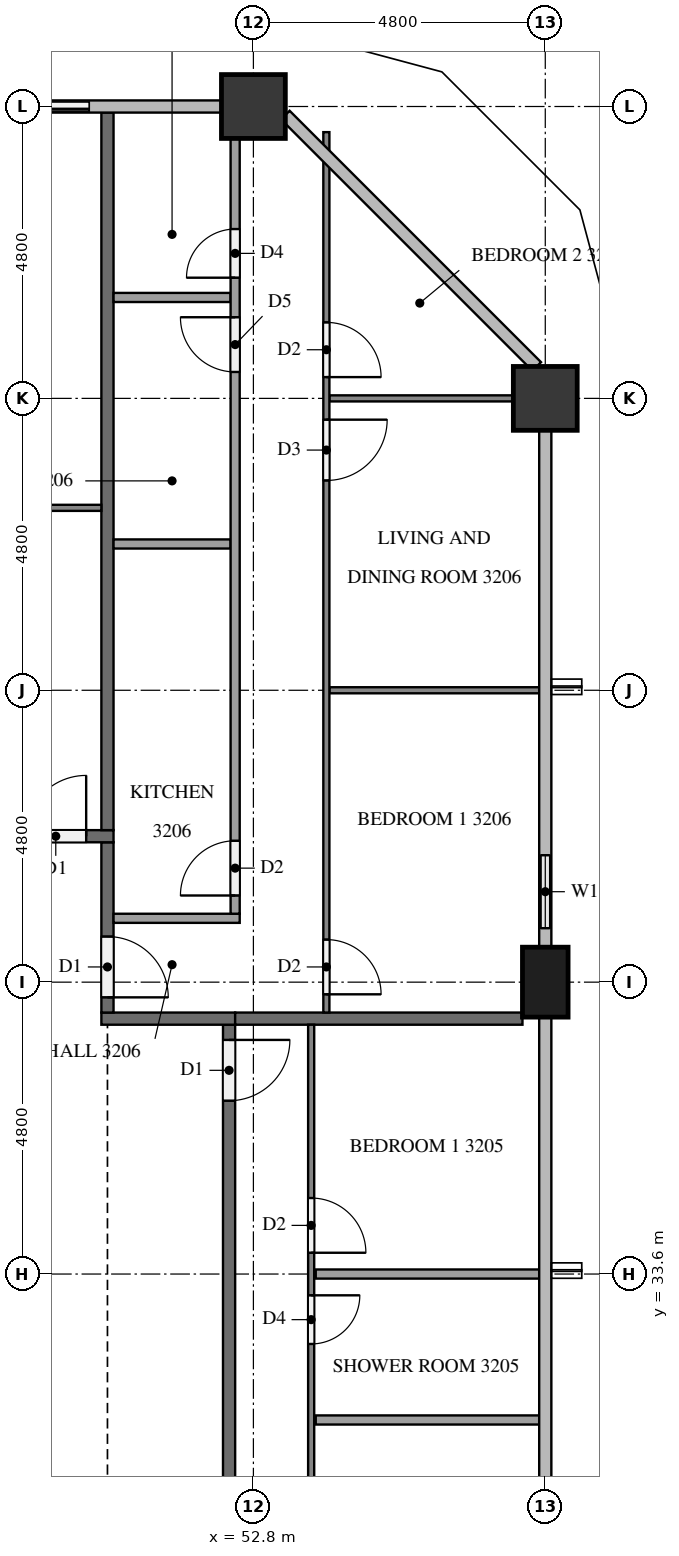
"""IFC4 building model, lengths in metres.
Left out: names, types, materials, properties, quantities, classifications, styles, units other than length and angle.
Written with IfcOpenShell. Run it as: python <this file> out.ifc"""

import sys

from ifc_helpers import new_model, si_unit, direction, frame, frame_2d, origin, origin_2d, place, context, subcontext, project, spatial, rectangle, extrude, element, fill, save


model = new_model("IFC4")
c1 = context("Model", 3, precision=1e-05, world=origin(), true_north=direction((0.0, 1.0)))
c2 = subcontext(c1, "Body", "Model", "MODEL_VIEW")
j1 = project(units=[si_unit("LENGTHUNIT", "METRE"), si_unit("PLANEANGLEUNIT", "RADIAN")], contexts=[c1])
p1 = place(None, origin())
s1 = spatial("IfcSite", under=j1, at=p1, CompositionType="ELEMENT")
p2 = place(p1, origin())
s2 = spatial("IfcBuilding", under=s1, at=p2, CompositionType="ELEMENT")
p3 = place(p2, frame((0.0, 0.0, 126.1)))
s3 = spatial("IfcBuildingStorey", under=s2, at=p3, CompositionType="ELEMENT", Elevation=126.1)
p4 = place(p3, frame((57.6, 38.4, 0.0), z_axis=(0.0, 0.0, 1.0), x_axis=(0.0, 1.0, 0.0)))
e1 = element("IfcColumn", 1, at=p4, inside=s3, PredefinedType="COLUMN", context=c2, shape_type="SweptSolid", body=[
    extrude(rectangle(XDim=1.15, YDim=0.75, at=origin_2d()), origin(), (0.0, 0.0, 1.0), 3.2),
])
for number, where, z_axis, x_axis in (
    (2, (57.6, 48.0, 0.0), (0.0, 0.0, 1.0), (1.0, 0.0, 0.0)),
    (3, (52.8, 52.8, 0.0), (0.0, 0.0, 1.0), (1.0, 0.0, 0.0)),
):
    element("IfcColumn", number, at=place(p3, frame(where, z_axis=z_axis, x_axis=x_axis)), inside=s3, PredefinedType="COLUMN", context=c2, shape_type="SweptSolid", body=[
        extrude(rectangle(XDim=1.05, YDim=1.05, at=origin_2d()), origin(), (0.0, 0.0, 1.0), 3.2),
    ])
p5 = place(p3, frame((57.6, 38.975, 0.0), z_axis=(0.0, 0.0, 1.0), x_axis=(0.0, 1.0, 0.0)))
e4 = element("IfcWall", 4, at=p5, inside=s3, PredefinedType="SOLIDWALL", context=c2, shape_type="SweptSolid", body=[
    extrude(rectangle(XDim=1.825, YDim=0.15, at=frame_2d((0.913, 0.0))), origin(), (0.0, 0.0, 1.0), 3.2),
])
p6 = place(p5, frame((0.312, 0.0, 0.9)))
e5 = element("IfcOpeningElement", 5, at=p6, cuts=e4, PredefinedType="OPENING", context=c2, shape_type="SweptSolid", body=[
    extrude(rectangle(XDim=1.2, YDim=1.4, at=frame_2d((0.6, 0.7))), frame((0.0, 0.085, 0.0), z_axis=(0.0, -1.0, 0.0), x_axis=(1.0, 0.0, 0.0)), (0.0, 0.0, 1.0), 0.17),
])
p7 = place(p3, frame((50.4, 52.8, 0.0), z_axis=(0.0, 0.0, 1.0), x_axis=(-1.0, 0.0, 0.0)))
e6 = element("IfcWall", 6, at=p7, inside=s3, PredefinedType="SOLIDWALL", context=c2, shape_type="SweptSolid", body=[
    extrude(rectangle(XDim=2.4, YDim=0.15, at=frame_2d((1.2, 0.0))), origin(), (0.0, 0.0, 1.0), 3.2),
])
p8 = place(p7, frame((0.3, 0.0, 0.0)))
e7 = element("IfcOpeningElement", 7, at=p8, cuts=e6, PredefinedType="OPENING", context=c2, shape_type="SweptSolid", body=[
    extrude(rectangle(XDim=1.8, YDim=2.4, at=frame_2d((0.9, 1.2))), frame((0.0, 0.085, 0.0), z_axis=(0.0, -1.0, 0.0), x_axis=(1.0, 0.0, 0.0)), (0.0, 0.0, 1.0), 0.17),
])
p9 = place(p3, frame((52.4, 37.7, 0.0), z_axis=(0.0, 0.0, 1.0), x_axis=(0.0, -1.0, 0.0)))
e8 = element("IfcWall", 8, at=p9, inside=s3, PredefinedType="PARTITIONING", context=c2, shape_type="SweptSolid", body=[
    extrude(rectangle(XDim=22.6, YDim=0.2, at=frame_2d((11.3, 0.0))), origin(), (0.0, 0.0, 1.0), 3.2),
])
p10 = place(p9, frame((0.25, 0.0, 0.0)))
e9 = element("IfcOpeningElement", 9, at=p10, cuts=e8, PredefinedType="OPENING", context=c2, shape_type="SweptSolid", body=[
    extrude(rectangle(XDim=1.0, YDim=2.1, at=frame_2d((0.5, 1.05))), frame((0.0, 0.11, 0.0), z_axis=(0.0, -1.0, 0.0), x_axis=(1.0, 0.0, 0.0)), (0.0, 0.0, 1.0), 0.22),
])
p11 = place(p3, frame((52.5, 37.8, 0.0), z_axis=(0.0, 0.0, 1.0), x_axis=(-1.0, 0.0, 0.0)))
e10 = element("IfcWall", 10, at=p11, inside=s3, PredefinedType="PARTITIONING", context=c2, shape_type="SweptSolid", body=[
    extrude(rectangle(XDim=2.2, YDim=0.2, at=frame_2d((1.1, 0.0))), origin(), (0.0, 0.0, 1.0), 3.2),
])
p12 = place(p3, frame((50.4, 40.7, 0.0), z_axis=(0.0, 0.0, 1.0), x_axis=(0.0, -1.0, 0.0)))
e11 = element("IfcWall", 11, at=p12, inside=s3, PredefinedType="PARTITIONING", context=c2, shape_type="SweptSolid", body=[
    extrude(rectangle(XDim=2.8, YDim=0.2, at=frame_2d((1.4, 0.0))), origin(), (0.0, 0.0, 1.0), 3.2),
])
p13 = place(p12, frame((1.55, 0.0, 0.0)))
e12 = element("IfcOpeningElement", 12, at=p13, cuts=e11, PredefinedType="OPENING", context=c2, shape_type="SweptSolid", body=[
    extrude(rectangle(XDim=1.0, YDim=2.1, at=frame_2d((0.5, 1.05))), frame((0.0, 0.11, 0.0), z_axis=(0.0, -1.0, 0.0), x_axis=(1.0, 0.0, 0.0)), (0.0, 0.0, 1.0), 0.22),
])
p14 = place(p3, frame((11.9, 40.8, 0.0), z_axis=(0.0, 0.0, 1.0), x_axis=(1.0, 0.0, 0.0)))
e13 = element("IfcWall", 13, at=p14, inside=s3, PredefinedType="PARTITIONING", context=c2, shape_type="SweptSolid", body=[
    extrude(rectangle(XDim=38.6, YDim=0.2, at=frame_2d((19.3, 0.0))), origin(), (0.0, 0.0, 1.0), 3.2),
])
p15 = place(p14, frame((37.15, 0.0, 0.0)))
e14 = element("IfcOpeningElement", 14, at=p15, cuts=e13, PredefinedType="OPENING", context=c2, shape_type="SweptSolid", body=[
    extrude(rectangle(XDim=1.0, YDim=2.1, at=frame_2d((0.5, 1.05))), frame((0.0, 0.11, 0.0), z_axis=(0.0, -1.0, 0.0), x_axis=(1.0, 0.0, 0.0)), (0.0, 0.0, 1.0), 0.22),
])
p16 = place(p14, frame((27.55, 0.0, 0.0)))
e15 = element("IfcOpeningElement", 15, at=p16, cuts=e13, PredefinedType="OPENING", context=c2, shape_type="SweptSolid", body=[
    extrude(rectangle(XDim=1.0, YDim=2.1, at=frame_2d((0.5, 1.05))), frame((0.0, 0.11, 0.0), z_axis=(0.0, -1.0, 0.0), x_axis=(1.0, 0.0, 0.0)), (0.0, 0.0, 1.0), 0.22),
])
p17 = place(p14, frame((13.15, 0.0, 0.0)))
e16 = element("IfcOpeningElement", 16, at=p17, cuts=e13, PredefinedType="OPENING", context=c2, shape_type="SweptSolid", body=[
    extrude(rectangle(XDim=1.0, YDim=2.1, at=frame_2d((0.5, 1.05))), frame((0.0, 0.11, 0.0), z_axis=(0.0, -1.0, 0.0), x_axis=(1.0, 0.0, 0.0)), (0.0, 0.0, 1.0), 0.22),
])
p18 = place(p3, frame((52.5, 37.8, 0.0), z_axis=(0.0, 0.0, 1.0), x_axis=(1.0, 0.0, 0.0)))
e17 = element("IfcWall", 17, at=p18, inside=s3, PredefinedType="PARTITIONING", context=c2, shape_type="SweptSolid", body=[
    extrude(rectangle(XDim=4.725, YDim=0.2, at=frame_2d((2.363, 0.0))), origin(), (0.0, 0.0, 1.0), 3.2),
])
p19 = place(p3, frame((50.4, 40.9, 0.0), z_axis=(0.0, 0.0, 1.0), x_axis=(0.0, 1.0, 0.0)))
e18 = element("IfcWall", 18, at=p19, inside=s3, PredefinedType="PARTITIONING", context=c2, shape_type="SweptSolid", body=[
    extrude(rectangle(XDim=11.8, YDim=0.2, at=frame_2d((5.9, 0.0))), origin(), (0.0, 0.0, 1.0), 3.2),
])
for number, where, z_axis, x_axis in (
    (19, (53.825, 33.6, 0.0), (0.0, 0.0, 1.0), (1.0, 0.0, 0.0)),
    (20, (53.825, 31.2, 0.0), (0.0, 0.0, 1.0), (1.0, 0.0, 0.0)),
):
    element("IfcWall", number, at=place(p3, frame(where, z_axis=z_axis, x_axis=x_axis)), inside=s3, PredefinedType="PARTITIONING", context=c2, shape_type="SweptSolid", body=[
        extrude(rectangle(XDim=3.675, YDim=0.15, at=frame_2d((1.837, 0.0))), origin(), (0.0, 0.0, 1.0), 3.2),
    ])
p20 = place(p3, frame((53.75, 37.7, 0.0), z_axis=(0.0, 0.0, 1.0), x_axis=(0.0, -1.0, 0.0)))
e21 = element("IfcWall", 21, at=p20, inside=s3, PredefinedType="PARTITIONING", context=c2, shape_type="SweptSolid", body=[
    extrude(rectangle(XDim=22.6, YDim=0.1, at=frame_2d((11.3, 0.0))), origin(), (0.0, 0.0, 1.0), 3.2),
])
p21 = place(p20, frame((2.85, 0.0, 0.0)))
e22 = element("IfcOpeningElement", 22, at=p21, cuts=e21, PredefinedType="OPENING", context=c2, shape_type="SweptSolid", body=[
    extrude(rectangle(XDim=0.9, YDim=2.1, at=frame_2d((0.45, 1.05))), frame((0.0, 0.06, 0.0), z_axis=(0.0, -1.0, 0.0), x_axis=(1.0, 0.0, 0.0)), (0.0, 0.0, 1.0), 0.12),
])
p22 = place(p20, frame((4.45, 0.0, 0.0)))
e23 = element("IfcOpeningElement", 23, at=p22, cuts=e21, PredefinedType="OPENING", context=c2, shape_type="SweptSolid", body=[
    extrude(rectangle(XDim=0.8, YDim=2.1, at=frame_2d((0.4, 1.05))), frame((0.0, 0.06, 0.0), z_axis=(0.0, -1.0, 0.0), x_axis=(1.0, 0.0, 0.0)), (0.0, 0.0, 1.0), 0.12),
])
p23 = place(p20, frame((7.65, 0.0, 0.0)))
e24 = element("IfcOpeningElement", 24, at=p23, cuts=e21, PredefinedType="OPENING", context=c2, shape_type="SweptSolid", body=[
    extrude(rectangle(XDim=0.9, YDim=2.1, at=frame_2d((0.45, 1.05))), frame((0.0, 0.06, 0.0), z_axis=(0.0, -1.0, 0.0), x_axis=(1.0, 0.0, 0.0)), (0.0, 0.0, 1.0), 0.12),
])
p24 = place(p20, frame((9.25, 0.0, 0.0)))
e25 = element("IfcOpeningElement", 25, at=p24, cuts=e21, PredefinedType="OPENING", context=c2, shape_type="SweptSolid", body=[
    extrude(rectangle(XDim=0.9, YDim=2.1, at=frame_2d((0.45, 1.05))), frame((0.0, 0.06, 0.0), z_axis=(0.0, -1.0, 0.0), x_axis=(1.0, 0.0, 0.0)), (0.0, 0.0, 1.0), 0.12),
])
p25 = place(p20, frame((17.15, 0.0, 0.0)))
e26 = element("IfcOpeningElement", 26, at=p25, cuts=e21, PredefinedType="OPENING", context=c2, shape_type="SweptSolid", body=[
    extrude(rectangle(XDim=1.0, YDim=2.1, at=frame_2d((0.5, 1.05))), frame((0.0, 0.06, 0.0), z_axis=(0.0, -1.0, 0.0), x_axis=(1.0, 0.0, 0.0)), (0.0, 0.0, 1.0), 0.12),
])
p26 = place(p20, frame((18.85, 0.0, 0.0)))
e27 = element("IfcOpeningElement", 27, at=p26, cuts=e21, PredefinedType="OPENING", context=c2, shape_type="SweptSolid", body=[
    extrude(rectangle(XDim=0.9, YDim=2.1, at=frame_2d((0.45, 1.05))), frame((0.0, 0.06, 0.0), z_axis=(0.0, -1.0, 0.0), x_axis=(1.0, 0.0, 0.0)), (0.0, 0.0, 1.0), 0.12),
])
p27 = place(p3, frame((54.05, 43.2, 0.0), z_axis=(0.0, 0.0, 1.0), x_axis=(1.0, 0.0, 0.0)))
e28 = element("IfcWall", 28, at=p27, inside=s3, PredefinedType="PARTITIONING", context=c2, shape_type="SweptSolid", body=[
    extrude(rectangle(XDim=3.45, YDim=0.1, at=frame_2d((1.725, 0.0))), origin(), (0.0, 0.0, 1.0), 3.2),
])
p28 = place(p3, frame((54.05, 48.0, 0.0), z_axis=(0.0, 0.0, 1.0), x_axis=(1.0, 0.0, 0.0)))
e29 = element("IfcWall", 29, at=p28, inside=s3, PredefinedType="PARTITIONING", context=c2, shape_type="SweptSolid", body=[
    extrude(rectangle(XDim=3.025, YDim=0.1, at=frame_2d((1.512, 0.0))), origin(), (0.0, 0.0, 1.0), 3.2),
])
p29 = place(p3, frame((54.0, 52.378, 0.0), z_axis=(0.0, 0.0, 1.0), x_axis=(0.0, -1.0, 0.0)))
e30 = element("IfcWall", 30, at=p29, inside=s3, PredefinedType="PARTITIONING", context=c2, shape_type="SweptSolid", body=[
    extrude(rectangle(XDim=14.479, YDim=0.1, at=frame_2d((7.239, 0.0))), origin(), (0.0, 0.0, 1.0), 3.2),
])
p30 = place(p29, frame((13.279, 0.0, 0.0)))
e31 = element("IfcOpeningElement", 31, at=p30, cuts=e30, PredefinedType="OPENING", context=c2, shape_type="SweptSolid", body=[
    extrude(rectangle(XDim=0.9, YDim=2.1, at=frame_2d((0.45, 1.05))), frame((0.0, 0.06, 0.0), z_axis=(0.0, -1.0, 0.0), x_axis=(1.0, 0.0, 0.0)), (0.0, 0.0, 1.0), 0.12),
])
p31 = place(p29, frame((4.729, 0.0, 0.0)))
e32 = element("IfcOpeningElement", 32, at=p31, cuts=e30, PredefinedType="OPENING", context=c2, shape_type="SweptSolid", body=[
    extrude(rectangle(XDim=1.0, YDim=2.1, at=frame_2d((0.5, 1.05))), frame((0.0, 0.06, 0.0), z_axis=(0.0, -1.0, 0.0), x_axis=(1.0, 0.0, 0.0)), (0.0, 0.0, 1.0), 0.12),
])
p32 = place(p29, frame((3.128, 0.0, 0.0)))
e33 = element("IfcOpeningElement", 33, at=p32, cuts=e30, PredefinedType="OPENING", context=c2, shape_type="SweptSolid", body=[
    extrude(rectangle(XDim=0.9, YDim=2.1, at=frame_2d((0.45, 1.05))), frame((0.0, 0.06, 0.0), z_axis=(0.0, -1.0, 0.0), x_axis=(1.0, 0.0, 0.0)), (0.0, 0.0, 1.0), 0.12),
])
for number, where, z_axis, x_axis in (
    (34, (50.5, 45.606, 0.0), (0.0, 0.0, 1.0), (1.0, 0.0, 0.0)),
    (35, (50.5, 49.66, 0.0), (0.0, 0.0, 1.0), (1.0, 0.0, 0.0)),
):
    element("IfcWall", number, at=place(p3, frame(where, z_axis=z_axis, x_axis=x_axis)), inside=s3, PredefinedType="PARTITIONING", context=c2, shape_type="SweptSolid", body=[
        extrude(rectangle(XDim=1.925, YDim=0.15, at=frame_2d((0.962, 0.0))), origin(), (0.0, 0.0, 1.0), 3.2),
    ])
p33 = place(p3, frame((50.5, 39.45, 0.0), z_axis=(0.0, 0.0, 1.0), x_axis=(1.0, 0.0, 0.0)))
e36 = element("IfcWall", 36, at=p33, inside=s3, PredefinedType="PARTITIONING", context=c2, shape_type="SweptSolid", body=[
    extrude(rectangle(XDim=2.075, YDim=0.15, at=frame_2d((1.038, 0.0))), origin(), (0.0, 0.0, 1.0), 3.2),
])
p34 = place(p3, frame((52.5, 39.525, 0.0), z_axis=(0.0, 0.0, 1.0), x_axis=(0.0, 1.0, 0.0)))
e37 = element("IfcWall", 37, at=p34, inside=s3, PredefinedType="PARTITIONING", context=c2, shape_type="SweptSolid", body=[
    extrude(rectangle(XDim=12.75, YDim=0.15, at=frame_2d((6.375, 0.0))), origin(), (0.0, 0.0, 1.0), 3.2),
])
p35 = place(p34, frame((0.3, 0.0, 0.0)))
e38 = element("IfcOpeningElement", 38, at=p35, cuts=e37, PredefinedType="OPENING", context=c2, shape_type="SweptSolid", body=[
    extrude(rectangle(XDim=0.9, YDim=2.1, at=frame_2d((0.45, 1.05))), frame((0.0, 0.085, 0.0), z_axis=(0.0, -1.0, 0.0), x_axis=(1.0, 0.0, 0.0)), (0.0, 0.0, 1.0), 0.17),
])
p36 = place(p34, frame((8.91, 0.0, 0.0)))
e39 = element("IfcOpeningElement", 39, at=p36, cuts=e37, PredefinedType="OPENING", context=c2, shape_type="SweptSolid", body=[
    extrude(rectangle(XDim=0.9, YDim=2.1, at=frame_2d((0.45, 1.05))), frame((0.0, 0.085, 0.0), z_axis=(0.0, -1.0, 0.0), x_axis=(1.0, 0.0, 0.0)), (0.0, 0.0, 1.0), 0.17),
])
p37 = place(p34, frame((10.46, 0.0, 0.0)))
e40 = element("IfcOpeningElement", 40, at=p37, cuts=e37, PredefinedType="OPENING", context=c2, shape_type="SweptSolid", body=[
    extrude(rectangle(XDim=0.8, YDim=2.1, at=frame_2d((0.4, 1.05))), frame((0.0, 0.085, 0.0), z_axis=(0.0, -1.0, 0.0), x_axis=(1.0, 0.0, 0.0)), (0.0, 0.0, 1.0), 0.17),
])
p38 = place(p3, frame((40.9, 46.2, 0.0), z_axis=(0.0, 0.0, 1.0), x_axis=(1.0, 0.0, 0.0)))
e41 = element("IfcWall", 41, at=p38, inside=s3, PredefinedType="PARTITIONING", context=c2, shape_type="SweptSolid", body=[
    extrude(rectangle(XDim=9.4, YDim=0.1, at=frame_2d((4.7, 0.0))), origin(), (0.0, 0.0, 1.0), 3.2),
])
p39 = place(p38, frame((5.05, 0.0, 0.0)))
e42 = element("IfcOpeningElement", 42, at=p39, cuts=e41, PredefinedType="OPENING", context=c2, shape_type="SweptSolid", body=[
    extrude(rectangle(XDim=1.0, YDim=2.1, at=frame_2d((0.5, 1.05))), frame((0.0, 0.06, 0.0), z_axis=(0.0, -1.0, 0.0), x_axis=(1.0, 0.0, 0.0)), (0.0, 0.0, 1.0), 0.12),
])
p40 = place(p38, frame((3.45, 0.0, 0.0)))
e43 = element("IfcOpeningElement", 43, at=p40, cuts=e41, PredefinedType="OPENING", context=c2, shape_type="SweptSolid", body=[
    extrude(rectangle(XDim=0.9, YDim=2.1, at=frame_2d((0.45, 1.05))), frame((0.0, 0.06, 0.0), z_axis=(0.0, -1.0, 0.0), x_axis=(1.0, 0.0, 0.0)), (0.0, 0.0, 1.0), 0.12),
])
p41 = place(p6, origin())
e44 = element("IfcWindow", 44, at=p41, inside=s3, PartitioningType="SINGLE_PANEL", PredefinedType="WINDOW", context=c2, shape_type="SweptSolid", body=[
    extrude(rectangle(XDim=1.2, YDim=1.4, at=frame_2d((0.6, 0.7))), frame((0.0, 0.03, 0.0), z_axis=(0.0, -1.0, 0.0), x_axis=(1.0, 0.0, 0.0)), (0.0, 0.0, 1.0), 0.06),
])
fill(e5, e44)
p42 = place(p8, origin())
e45 = element("IfcDoor", 45, at=p42, inside=s3, OperationType="SLIDING_TO_LEFT", PredefinedType="DOOR", context=c2, shape_type="SweptSolid", body=[
    extrude(rectangle(XDim=1.8, YDim=2.4, at=frame_2d((0.9, 1.2))), frame((0.0, 0.025, 0.0), z_axis=(0.0, -1.0, 0.0), x_axis=(1.0, 0.0, 0.0)), (0.0, 0.0, 1.0), 0.05),
])
fill(e7, e45)
p43 = place(p10, origin())
e46 = element("IfcDoor", 46, at=p43, inside=s3, OperationType="SINGLE_SWING_LEFT", PredefinedType="DOOR", context=c2, shape_type="SweptSolid", body=[
    extrude(rectangle(XDim=1.0, YDim=2.1, at=frame_2d((0.5, 1.05))), frame((0.0, 0.025, 0.0), z_axis=(0.0, -1.0, 0.0), x_axis=(1.0, 0.0, 0.0)), (0.0, 0.0, 1.0), 0.05),
])
fill(e9, e46)
p44 = place(p13, origin())
e47 = element("IfcDoor", 47, at=p44, inside=s3, OperationType="SINGLE_SWING_RIGHT", PredefinedType="DOOR", context=c2, shape_type="SweptSolid", body=[
    extrude(rectangle(XDim=1.0, YDim=2.1, at=frame_2d((0.5, 1.05))), frame((0.0, 0.025, 0.0), z_axis=(0.0, -1.0, 0.0), x_axis=(1.0, 0.0, 0.0)), (0.0, 0.0, 1.0), 0.05),
])
fill(e12, e47)
p45 = place(p15, origin())
e48 = element("IfcDoor", 48, at=p45, inside=s3, OperationType="SINGLE_SWING_RIGHT", PredefinedType="DOOR", context=c2, shape_type="SweptSolid", body=[
    extrude(rectangle(XDim=1.0, YDim=2.1, at=frame_2d((0.5, 1.05))), frame((0.0, 0.025, 0.0), z_axis=(0.0, -1.0, 0.0), x_axis=(1.0, 0.0, 0.0)), (0.0, 0.0, 1.0), 0.05),
])
fill(e14, e48)
p46 = place(p21, origin())
e49 = element("IfcDoor", 49, at=p46, inside=s3, OperationType="SINGLE_SWING_RIGHT", PredefinedType="DOOR", context=c2, shape_type="SweptSolid", body=[
    extrude(rectangle(XDim=0.9, YDim=2.1, at=frame_2d((0.45, 1.05))), frame((0.0, 0.025, 0.0), z_axis=(0.0, -1.0, 0.0), x_axis=(1.0, 0.0, 0.0)), (0.0, 0.0, 1.0), 0.05),
])
fill(e22, e49)
p47 = place(p22, origin())
e50 = element("IfcDoor", 50, at=p47, inside=s3, OperationType="SINGLE_SWING_LEFT", PredefinedType="DOOR", context=c2, shape_type="SweptSolid", body=[
    extrude(rectangle(XDim=0.8, YDim=2.1, at=frame_2d((0.4, 1.05))), frame((0.0, 0.025, 0.0), z_axis=(0.0, -1.0, 0.0), x_axis=(1.0, 0.0, 0.0)), (0.0, 0.0, 1.0), 0.05),
])
fill(e23, e50)
p48 = place(p30, origin())
e51 = element("IfcDoor", 51, at=p48, inside=s3, OperationType="SINGLE_SWING_RIGHT", PredefinedType="DOOR", context=c2, shape_type="SweptSolid", body=[
    extrude(rectangle(XDim=0.9, YDim=2.1, at=frame_2d((0.45, 1.05))), frame((0.0, 0.025, 0.0), z_axis=(0.0, -1.0, 0.0), x_axis=(1.0, 0.0, 0.0)), (0.0, 0.0, 1.0), 0.05),
])
fill(e31, e51)
p49 = place(p31, origin())
e52 = element("IfcDoor", 52, at=p49, inside=s3, OperationType="SINGLE_SWING_LEFT", PredefinedType="DOOR", context=c2, shape_type="SweptSolid", body=[
    extrude(rectangle(XDim=1.0, YDim=2.1, at=frame_2d((0.5, 1.05))), frame((0.0, 0.025, 0.0), z_axis=(0.0, -1.0, 0.0), x_axis=(1.0, 0.0, 0.0)), (0.0, 0.0, 1.0), 0.05),
])
fill(e32, e52)
p50 = place(p32, origin())
e53 = element("IfcDoor", 53, at=p50, inside=s3, OperationType="SINGLE_SWING_RIGHT", PredefinedType="DOOR", context=c2, shape_type="SweptSolid", body=[
    extrude(rectangle(XDim=0.9, YDim=2.1, at=frame_2d((0.45, 1.05))), frame((0.0, 0.025, 0.0), z_axis=(0.0, -1.0, 0.0), x_axis=(1.0, 0.0, 0.0)), (0.0, 0.0, 1.0), 0.05),
])
fill(e33, e53)
p51 = place(p35, origin())
e54 = element("IfcDoor", 54, at=p51, inside=s3, OperationType="SINGLE_SWING_LEFT", PredefinedType="DOOR", context=c2, shape_type="SweptSolid", body=[
    extrude(rectangle(XDim=0.9, YDim=2.1, at=frame_2d((0.45, 1.05))), frame((0.0, 0.025, 0.0), z_axis=(0.0, -1.0, 0.0), x_axis=(1.0, 0.0, 0.0)), (0.0, 0.0, 1.0), 0.05),
])
fill(e38, e54)
p52 = place(p36, origin())
e55 = element("IfcDoor", 55, at=p52, inside=s3, OperationType="SINGLE_SWING_RIGHT", PredefinedType="DOOR", context=c2, shape_type="SweptSolid", body=[
    extrude(rectangle(XDim=0.9, YDim=2.1, at=frame_2d((0.45, 1.05))), frame((0.0, 0.025, 0.0), z_axis=(0.0, -1.0, 0.0), x_axis=(1.0, 0.0, 0.0)), (0.0, 0.0, 1.0), 0.05),
])
fill(e39, e55)
p53 = place(p37, origin())
e56 = element("IfcDoor", 56, at=p53, inside=s3, OperationType="SINGLE_SWING_LEFT", PredefinedType="DOOR", context=c2, shape_type="SweptSolid", body=[
    extrude(rectangle(XDim=0.8, YDim=2.1, at=frame_2d((0.4, 1.05))), frame((0.0, 0.025, 0.0), z_axis=(0.0, -1.0, 0.0), x_axis=(1.0, 0.0, 0.0)), (0.0, 0.0, 1.0), 0.05),
])
fill(e40, e56)
save(model, sys.argv[1])
